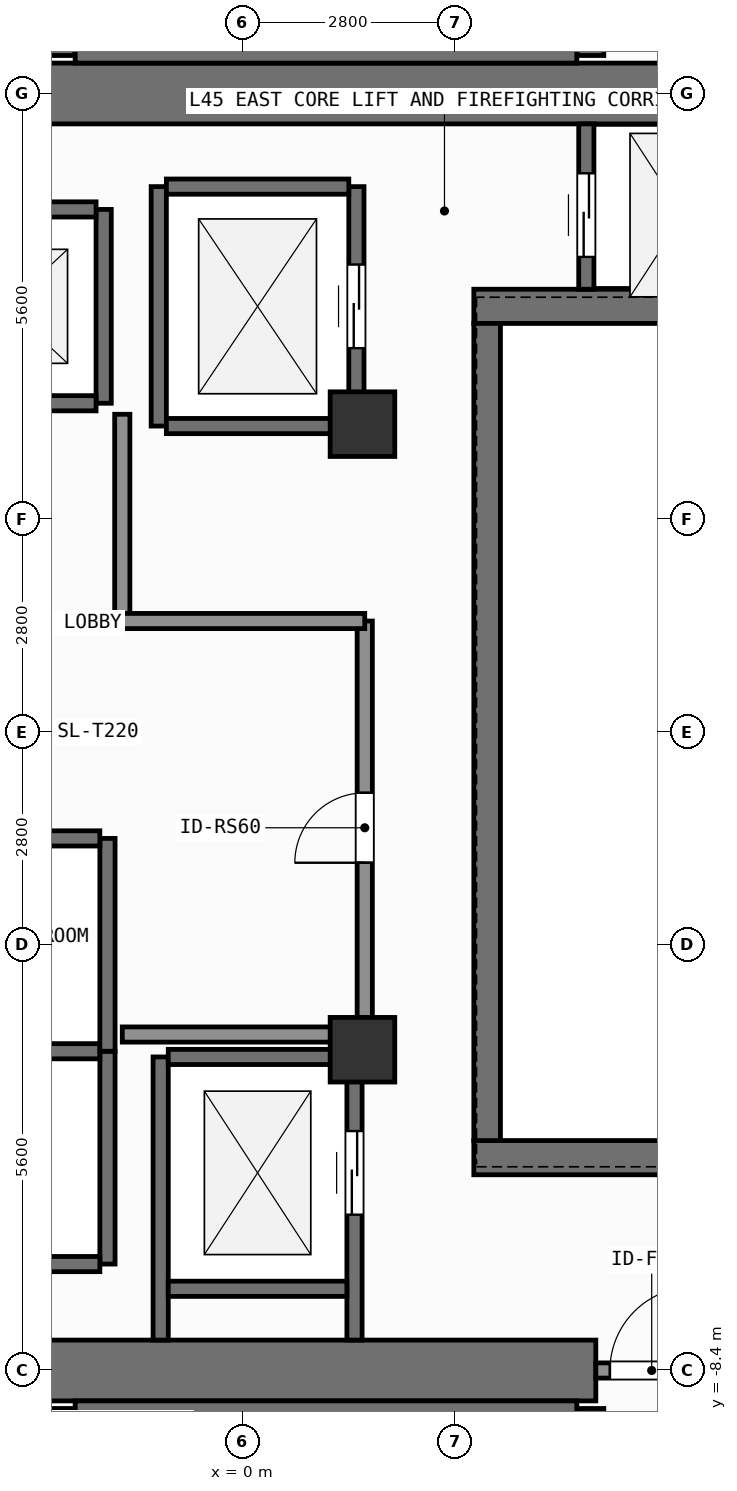
"""IFC4 building model, lengths in metres.
Left out: names, types, materials, properties, quantities, classifications, styles, units other than length and angle.
Written with IfcOpenShell. Run it as: python <this file> out.ifc"""

import sys

from ifc_helpers import new_model, si_unit, direction, frame, frame_2d, origin, origin_2d, place, context, subcontext, project, spatial, rectangle, extrude, element, fill, save


model = new_model("IFC4")
c1 = context("Model", 3, precision=1e-05, world=origin(), true_north=direction((0.0, 1.0)))
c2 = subcontext(c1, "Body", "Model", "MODEL_VIEW")
j1 = project(units=[si_unit("LENGTHUNIT", "METRE"), si_unit("PLANEANGLEUNIT", "RADIAN")], contexts=[c1])
p1 = place(None, origin())
s1 = spatial("IfcSite", under=j1, at=p1, CompositionType="ELEMENT")
p2 = place(p1, origin())
s2 = spatial("IfcBuilding", under=s1, at=p2, CompositionType="ELEMENT")
p3 = place(p2, frame((0.0, 0.0, 183.6)))
s3 = spatial("IfcBuildingStorey", under=s2, at=p3, CompositionType="ELEMENT", Elevation=183.6)
p4 = place(p3, frame((-2.62, -8.4, 0.0), z_axis=(0.0, 0.0, 1.0), x_axis=(1.0, 0.0, 0.0)))
e1 = element("IfcWall", 1, at=p4, inside=s3, PredefinedType="SHEAR", context=c2, shape_type="SweptSolid", body=[
    extrude(rectangle(XDim=7.27, YDim=0.8, at=frame_2d((3.635, 0.0))), origin(), (0.0, 0.0, 1.0), 3.9),
])
p5 = place(p3, frame((-7.55, 8.4, 0.0), z_axis=(0.0, 0.0, 1.0), x_axis=(1.0, 0.0, 0.0)))
e2 = element("IfcWall", 2, at=p5, inside=s3, PredefinedType="SHEAR", context=c2, shape_type="SweptSolid", body=[
    extrude(rectangle(XDim=16.35, YDim=0.8, at=frame_2d((8.175, 0.0))), origin(), (0.0, 0.0, 1.0), 3.9),
])
for number, where, z_axis, x_axis in (
    (3, (3.045, -5.6, 0.0), (0.0, 0.0, 1.0), (1.0, 0.0, 0.0)),
    (4, (3.045, 5.6, 0.0), (0.0, 0.0, 1.0), (1.0, 0.0, 0.0)),
):
    element("IfcWall", number, at=place(p3, frame(where, z_axis=z_axis, x_axis=x_axis)), inside=s3, PredefinedType="SHEAR", context=c2, shape_type="SweptSolid", body=[
        extrude(rectangle(XDim=5.755, YDim=0.45, at=frame_2d((2.877, 0.0))), origin(), (0.0, 0.0, 1.0), 3.9),
    ])
p6 = place(p3, frame((3.22, -5.375, 0.0), z_axis=(0.0, 0.0, 1.0), x_axis=(0.0, 1.0, 0.0)))
e5 = element("IfcWall", 5, at=p6, inside=s3, PredefinedType="SHEAR", context=c2, shape_type="SweptSolid", body=[
    extrude(rectangle(XDim=10.75, YDim=0.35, at=frame_2d((5.375, 0.0))), origin(), (0.0, 0.0, 1.0), 3.9),
])
p7 = place(p3, frame((-2.2, -8.913, 0.0), z_axis=(0.0, 0.0, 1.0), x_axis=(1.0, 0.0, 0.0)))
e6 = element("IfcWall", 6, at=p7, inside=s3, PredefinedType="SHEAR", context=c2, shape_type="SweptSolid", body=[
    extrude(rectangle(XDim=6.6, YDim=0.225, at=frame_2d((3.3, 0.0))), origin(), (0.0, 0.0, 1.0), 3.9),
])
p8 = place(p3, frame((-2.38, -11.825, 0.0), z_axis=(0.0, 0.0, 1.0), x_axis=(0.0, 1.0, 0.0)))
e7 = element("IfcWall", 7, at=p8, inside=s3, PredefinedType="SHEAR", context=c2, shape_type="SweptSolid", body=[
    extrude(rectangle(XDim=2.925, YDim=0.35, at=frame_2d((1.462, 0.0))), origin(), (0.0, 0.0, 1.0), 3.9),
])
p9 = place(p3, frame((4.58, -8.9, 0.0), z_axis=(0.0, 0.0, 1.0), x_axis=(0.0, -1.0, 0.0)))
e8 = element("IfcWall", 8, at=p9, inside=s3, PredefinedType="SHEAR", context=c2, shape_type="SweptSolid", body=[
    extrude(rectangle(XDim=2.925, YDim=0.35, at=frame_2d((1.462, 0.0))), origin(), (0.0, 0.0, 1.0), 3.9),
])
p10 = place(p9, frame((0.913, 0.0, 0.0)))
e9 = element("IfcOpeningElement", 9, at=p10, cuts=e8, PredefinedType="OPENING", context=c2, shape_type="SweptSolid", body=[
    extrude(rectangle(XDim=1.1, YDim=2.15, at=frame_2d((0.55, 1.075))), frame((0.0, 0.185, 0.0), z_axis=(0.0, -1.0, 0.0), x_axis=(1.0, 0.0, 0.0)), (0.0, 0.0, 1.0), 0.37),
])
p11 = place(p3, frame((-2.2, 8.913, 0.0), z_axis=(0.0, 0.0, 1.0), x_axis=(1.0, 0.0, 0.0)))
e10 = element("IfcWall", 10, at=p11, inside=s3, PredefinedType="SHEAR", context=c2, shape_type="SweptSolid", body=[
    extrude(rectangle(XDim=6.6, YDim=0.225, at=frame_2d((3.3, 0.0))), origin(), (0.0, 0.0, 1.0), 3.9),
])
p12 = place(p3, frame((-2.38, 8.9, 0.0), z_axis=(0.0, 0.0, 1.0), x_axis=(0.0, 1.0, 0.0)))
e11 = element("IfcWall", 11, at=p12, inside=s3, PredefinedType="SHEAR", context=c2, shape_type="SweptSolid", body=[
    extrude(rectangle(XDim=2.925, YDim=0.35, at=frame_2d((1.462, 0.0))), origin(), (0.0, 0.0, 1.0), 3.9),
])
p13 = place(p3, frame((4.58, 11.825, 0.0), z_axis=(0.0, 0.0, 1.0), x_axis=(0.0, -1.0, 0.0)))
e12 = element("IfcWall", 12, at=p13, inside=s3, PredefinedType="SHEAR", context=c2, shape_type="SweptSolid", body=[
    extrude(rectangle(XDim=2.925, YDim=0.35, at=frame_2d((1.462, 0.0))), origin(), (0.0, 0.0, 1.0), 3.9),
])
p14 = place(p13, frame((0.913, 0.0, 0.0)))
e13 = element("IfcOpeningElement", 13, at=p14, cuts=e12, PredefinedType="OPENING", context=c2, shape_type="SweptSolid", body=[
    extrude(rectangle(XDim=1.1, YDim=2.15, at=frame_2d((0.55, 1.075))), frame((0.0, 0.185, 0.0), z_axis=(0.0, -1.0, 0.0), x_axis=(1.0, 0.0, 0.0)), (0.0, 0.0, 1.0), 0.37),
])
for number, where, z_axis, x_axis in (
    (14, (1.58, -4.18, 0.0), (0.0, 0.0, 1.0), (1.0, 0.0, 0.0)),
    (15, (1.58, 4.05, 0.0), (0.0, 0.0, 1.0), (1.0, 0.0, 0.0)),
):
    element("IfcColumn", number, at=place(p3, frame(where, z_axis=z_axis, x_axis=x_axis)), inside=s3, PredefinedType="COLUMN", context=c2, shape_type="SweptSolid", body=[
        extrude(rectangle(XDim=0.85, YDim=0.85, at=origin_2d()), origin(), (0.0, 0.0, 1.0), 3.9),
    ])
p15 = place(p3, frame((-1.825, 4.325, 0.0), z_axis=(0.0, 0.0, 1.0), x_axis=(0.0, 1.0, 0.0)))
e16 = element("IfcWall", 16, at=p15, inside=s3, PredefinedType="SHEAR", context=c2, shape_type="SweptSolid", body=[
    extrude(rectangle(XDim=2.55, YDim=0.2, at=frame_2d((1.275, 0.0))), origin(), (0.0, 0.0, 1.0), 3.68),
])
p16 = place(p3, frame((-4.275, 4.325, 0.0), z_axis=(0.0, 0.0, 1.0), x_axis=(1.0, 0.0, 0.0)))
e17 = element("IfcWall", 17, at=p16, inside=s3, PredefinedType="SHEAR", context=c2, shape_type="SweptSolid", body=[
    extrude(rectangle(XDim=2.35, YDim=0.2, at=frame_2d((1.175, 0.0))), origin(), (0.0, 0.0, 1.0), 3.68),
])
p17 = place(p16, frame((0.625, 0.0, 0.0)))
e18 = element("IfcOpeningElement", 18, at=p17, cuts=e17, PredefinedType="OPENING", context=c2, shape_type="SweptSolid", body=[
    extrude(rectangle(XDim=1.1, YDim=2.2, at=frame_2d((0.55, 1.1))), frame((0.0, 0.11, 0.0), z_axis=(0.0, -1.0, 0.0), x_axis=(1.0, 0.0, 0.0)), (0.0, 0.0, 1.0), 0.22),
])
p18 = place(p3, frame((-4.275, 6.875, 0.0), z_axis=(0.0, 0.0, 1.0), x_axis=(1.0, 0.0, 0.0)))
e19 = element("IfcWall", 19, at=p18, inside=s3, PredefinedType="SHEAR", context=c2, shape_type="SweptSolid", body=[
    extrude(rectangle(XDim=2.35, YDim=0.2, at=frame_2d((1.175, 0.0))), origin(), (0.0, 0.0, 1.0), 3.68),
])
p19 = place(p3, frame((-1.775, -7.0, 0.0), z_axis=(0.0, 0.0, 1.0), x_axis=(0.0, 1.0, 0.0)))
e20 = element("IfcWall", 20, at=p19, inside=s3, PredefinedType="SHEAR", context=c2, shape_type="SweptSolid", body=[
    extrude(rectangle(XDim=2.8, YDim=0.2, at=frame_2d((1.4, 0.0))), origin(), (0.0, 0.0, 1.0), 3.68),
])
for number, where, z_axis, x_axis in (
    (21, (-4.325, -7.0, 0.0), (0.0, 0.0, 1.0), (1.0, 0.0, 0.0)),
    (22, (-4.325, -4.2, 0.0), (0.0, 0.0, 1.0), (1.0, 0.0, 0.0)),
):
    element("IfcWall", number, at=place(p3, frame(where, z_axis=z_axis, x_axis=x_axis)), inside=s3, PredefinedType="SHEAR", context=c2, shape_type="SweptSolid", body=[
        extrude(rectangle(XDim=2.45, YDim=0.2, at=frame_2d((1.225, 0.0))), origin(), (0.0, 0.0, 1.0), 3.68),
    ])
p20 = place(p3, frame((-1.775, -4.2, 0.0), z_axis=(0.0, 0.0, 1.0), x_axis=(0.0, 1.0, 0.0)))
e23 = element("IfcWall", 23, at=p20, inside=s3, PredefinedType="SHEAR", context=c2, shape_type="SweptSolid", body=[
    extrude(rectangle(XDim=2.8, YDim=0.2, at=frame_2d((1.4, 0.0))), origin(), (0.0, 0.0, 1.0), 3.68),
])
p21 = place(p3, frame((-4.325, -1.4, 0.0), z_axis=(0.0, 0.0, 1.0), x_axis=(1.0, 0.0, 0.0)))
e24 = element("IfcWall", 24, at=p21, inside=s3, PredefinedType="SHEAR", context=c2, shape_type="SweptSolid", body=[
    extrude(rectangle(XDim=2.45, YDim=0.2, at=frame_2d((1.225, 0.0))), origin(), (0.0, 0.0, 1.0), 3.68),
])
p22 = place(p3, frame((-1.1, 4.025, 0.0), z_axis=(0.0, 0.0, 1.0), x_axis=(0.0, 1.0, 0.0)))
e25 = element("IfcWall", 25, at=p22, inside=s3, PredefinedType="SHEAR", context=c2, shape_type="SweptSolid", body=[
    extrude(rectangle(XDim=3.15, YDim=0.2, at=frame_2d((1.575, 0.0))), origin(), (0.0, 0.0, 1.0), 3.68),
])
p23 = place(p3, frame((1.5, 4.025, 0.0), z_axis=(0.0, 0.0, 1.0), x_axis=(0.0, 1.0, 0.0)))
e26 = element("IfcWall", 26, at=p23, inside=s3, PredefinedType="SHEAR", context=c2, shape_type="SweptSolid", body=[
    extrude(rectangle(XDim=3.15, YDim=0.2, at=frame_2d((1.575, 0.0))), origin(), (0.0, 0.0, 1.0), 3.68),
])
p24 = place(p23, frame((1.025, 0.0, 0.0)))
e27 = element("IfcOpeningElement", 27, at=p24, cuts=e26, PredefinedType="OPENING", context=c2, shape_type="SweptSolid", body=[
    extrude(rectangle(XDim=1.1, YDim=2.2, at=frame_2d((0.55, 1.1))), frame((0.0, 0.11, 0.0), z_axis=(0.0, -1.0, 0.0), x_axis=(1.0, 0.0, 0.0)), (0.0, 0.0, 1.0), 0.22),
])
for number, where, z_axis, x_axis in (
    (28, (-1.0, 4.025, 0.0), (0.0, 0.0, 1.0), (1.0, 0.0, 0.0)),
    (29, (-1.0, 7.175, 0.0), (0.0, 0.0, 1.0), (1.0, 0.0, 0.0)),
):
    element("IfcWall", number, at=place(p3, frame(where, z_axis=z_axis, x_axis=x_axis)), inside=s3, PredefinedType="SHEAR", context=c2, shape_type="SweptSolid", body=[
        extrude(rectangle(XDim=2.4, YDim=0.2, at=frame_2d((1.2, 0.0))), origin(), (0.0, 0.0, 1.0), 3.68),
    ])
p25 = place(p3, frame((-1.075, -8.0, 0.0), z_axis=(0.0, 0.0, 1.0), x_axis=(0.0, 1.0, 0.0)))
e30 = element("IfcWall", 30, at=p25, inside=s3, PredefinedType="SHEAR", context=c2, shape_type="SweptSolid", body=[
    extrude(rectangle(XDim=3.725, YDim=0.2, at=frame_2d((1.863, 0.0))), origin(), (0.0, 0.0, 1.0), 3.68),
])
p26 = place(p3, frame((1.475, -8.0, 0.0), z_axis=(0.0, 0.0, 1.0), x_axis=(0.0, 1.0, 0.0)))
e31 = element("IfcWall", 31, at=p26, inside=s3, PredefinedType="SHEAR", context=c2, shape_type="SweptSolid", body=[
    extrude(rectangle(XDim=3.725, YDim=0.2, at=frame_2d((1.863, 0.0))), origin(), (0.0, 0.0, 1.0), 3.68),
])
p27 = place(p26, frame((1.65, 0.0, 0.0)))
e32 = element("IfcOpeningElement", 32, at=p27, cuts=e31, PredefinedType="OPENING", context=c2, shape_type="SweptSolid", body=[
    extrude(rectangle(XDim=1.1, YDim=2.2, at=frame_2d((0.55, 1.1))), frame((0.0, 0.11, 0.0), z_axis=(0.0, -1.0, 0.0), x_axis=(1.0, 0.0, 0.0)), (0.0, 0.0, 1.0), 0.22),
])
for number, where, z_axis, x_axis in (
    (33, (-0.975, -7.325, 0.0), (0.0, 0.0, 1.0), (1.0, 0.0, 0.0)),
    (34, (-0.975, -4.275, 0.0), (0.0, 0.0, 1.0), (1.0, 0.0, 0.0)),
):
    element("IfcWall", number, at=place(p3, frame(where, z_axis=z_axis, x_axis=x_axis)), inside=s3, PredefinedType="SHEAR", context=c2, shape_type="SweptSolid", body=[
        extrude(rectangle(XDim=2.35, YDim=0.2, at=frame_2d((1.175, 0.0))), origin(), (0.0, 0.0, 1.0), 3.68),
    ])
p28 = place(p3, frame((4.525, 5.825, 0.0), z_axis=(0.0, 0.0, 1.0), x_axis=(0.0, 1.0, 0.0)))
e35 = element("IfcWall", 35, at=p28, inside=s3, PredefinedType="SHEAR", context=c2, shape_type="SweptSolid", body=[
    extrude(rectangle(XDim=2.175, YDim=0.2, at=frame_2d((1.087, 0.0))), origin(), (0.0, 0.0, 1.0), 3.68),
])
p29 = place(p28, frame((0.425, 0.0, 0.0)))
e36 = element("IfcOpeningElement", 36, at=p29, cuts=e35, PredefinedType="OPENING", context=c2, shape_type="SweptSolid", body=[
    extrude(rectangle(XDim=1.1, YDim=2.2, at=frame_2d((0.55, 1.1))), frame((0.0, 0.11, 0.0), z_axis=(0.0, -1.0, 0.0), x_axis=(1.0, 0.0, 0.0)), (0.0, 0.0, 1.0), 0.22),
])
p30 = place(p3, frame((4.65, -8.4, 0.0), z_axis=(0.0, 0.0, 1.0), x_axis=(1.0, 0.0, 0.0)))
e37 = element("IfcWall", 37, at=p30, inside=s3, PredefinedType="SOLIDWALL", context=c2, shape_type="SweptSolid", body=[
    extrude(rectangle(XDim=1.47, YDim=0.2, at=frame_2d((0.735, 0.0))), origin(), (0.0, 0.0, 1.0), 2.82),
])
p31 = place(p30, frame((0.185, 0.0, 0.0)))
e38 = element("IfcOpeningElement", 38, at=p31, cuts=e37, PredefinedType="OPENING", context=c2, shape_type="SweptSolid", body=[
    extrude(rectangle(XDim=1.1, YDim=2.15, at=frame_2d((0.55, 1.075))), frame((0.0, 0.11, 0.0), z_axis=(0.0, -1.0, 0.0), x_axis=(1.0, 0.0, 0.0)), (0.0, 0.0, 1.0), 0.22),
])
p32 = place(p3, frame((1.61, -3.98, 0.0), z_axis=(0.0, 0.0, 1.0), x_axis=(0.0, 1.0, 0.0)))
e39 = element("IfcWall", 39, at=p32, inside=s3, PredefinedType="SOLIDWALL", context=c2, shape_type="SweptSolid", body=[
    extrude(rectangle(XDim=5.44, YDim=0.2, at=frame_2d((2.72, 0.0))), origin(), (0.0, 0.0, 1.0), 3.68),
])
p33 = place(p32, frame((2.26, 0.0, 0.0)))
e40 = element("IfcOpeningElement", 40, at=p33, cuts=e39, PredefinedType="OPENING", context=c2, shape_type="SweptSolid", body=[
    extrude(rectangle(XDim=0.92, YDim=2.1, at=frame_2d((0.46, 1.05))), frame((0.0, 0.11, 0.0), z_axis=(0.0, -1.0, 0.0), x_axis=(1.0, 0.0, 0.0)), (0.0, 0.0, 1.0), 0.22),
])
p34 = place(p3, frame((-1.58, 1.48, 0.0), z_axis=(0.0, 0.0, 1.0), x_axis=(0.0, 1.0, 0.0)))
e41 = element("IfcWall", 41, at=p34, inside=s3, PredefinedType="SOLIDWALL", context=c2, shape_type="SweptSolid", body=[
    extrude(rectangle(XDim=2.7, YDim=0.2, at=frame_2d((1.35, 0.0))), origin(), (0.0, 0.0, 1.0), 3.68),
])
for number, where, z_axis, x_axis in (
    (42, (-1.58, -3.98, 0.0), (0.0, 0.0, 1.0), (1.0, 0.0, 0.0)),
    (43, (-1.58, 1.46, 0.0), (0.0, 0.0, 1.0), (1.0, 0.0, 0.0)),
):
    element("IfcWall", number, at=place(p3, frame(where, z_axis=z_axis, x_axis=x_axis)), inside=s3, PredefinedType="SOLIDWALL", context=c2, shape_type="SweptSolid", body=[
        extrude(rectangle(XDim=3.19, YDim=0.2, at=frame_2d((1.595, 0.0))), origin(), (0.0, 0.0, 1.0), 3.68),
    ])
p35 = place(p24, origin())
e44 = element("IfcDoor", 44, at=p35, inside=s3, OperationType="SLIDING_TO_LEFT", PredefinedType="DOOR", context=c2, shape_type="SweptSolid", body=[
    extrude(rectangle(XDim=1.1, YDim=2.2, at=frame_2d((0.55, 1.1))), frame((0.0, 0.025, 0.0), z_axis=(0.0, -1.0, 0.0), x_axis=(1.0, 0.0, 0.0)), (0.0, 0.0, 1.0), 0.05),
])
fill(e27, e44)
p36 = place(p27, origin())
e45 = element("IfcDoor", 45, at=p36, inside=s3, OperationType="SLIDING_TO_LEFT", PredefinedType="DOOR", context=c2, shape_type="SweptSolid", body=[
    extrude(rectangle(XDim=1.1, YDim=2.2, at=frame_2d((0.55, 1.1))), frame((0.0, 0.025, 0.0), z_axis=(0.0, -1.0, 0.0), x_axis=(1.0, 0.0, 0.0)), (0.0, 0.0, 1.0), 0.05),
])
fill(e32, e45)
p37 = place(p29, origin())
e46 = element("IfcDoor", 46, at=p37, inside=s3, OperationType="SLIDING_TO_LEFT", PredefinedType="DOOR", context=c2, shape_type="SweptSolid", body=[
    extrude(rectangle(XDim=1.1, YDim=2.2, at=frame_2d((0.55, 1.1))), frame((0.0, 0.025, 0.0), z_axis=(0.0, -1.0, 0.0), x_axis=(1.0, 0.0, 0.0)), (0.0, 0.0, 1.0), 0.05),
])
fill(e36, e46)
p38 = place(p31, origin())
e47 = element("IfcDoor", 47, at=p38, inside=s3, OperationType="SINGLE_SWING_RIGHT", PredefinedType="DOOR", context=c2, shape_type="SweptSolid", body=[
    extrude(rectangle(XDim=1.1, YDim=2.15, at=frame_2d((0.55, 1.075))), frame((0.0, 0.025, 0.0), z_axis=(0.0, -1.0, 0.0), x_axis=(1.0, 0.0, 0.0)), (0.0, 0.0, 1.0), 0.05),
])
fill(e38, e47)
p39 = place(p33, origin())
e48 = element("IfcDoor", 48, at=p39, inside=s3, OperationType="SINGLE_SWING_LEFT", PredefinedType="DOOR", context=c2, shape_type="SweptSolid", body=[
    extrude(rectangle(XDim=0.92, YDim=2.1, at=frame_2d((0.46, 1.05))), frame((0.0, 0.025, 0.0), z_axis=(0.0, -1.0, 0.0), x_axis=(1.0, 0.0, 0.0)), (0.0, 0.0, 1.0), 0.05),
])
fill(e40, e48)
save(model, sys.argv[1])
